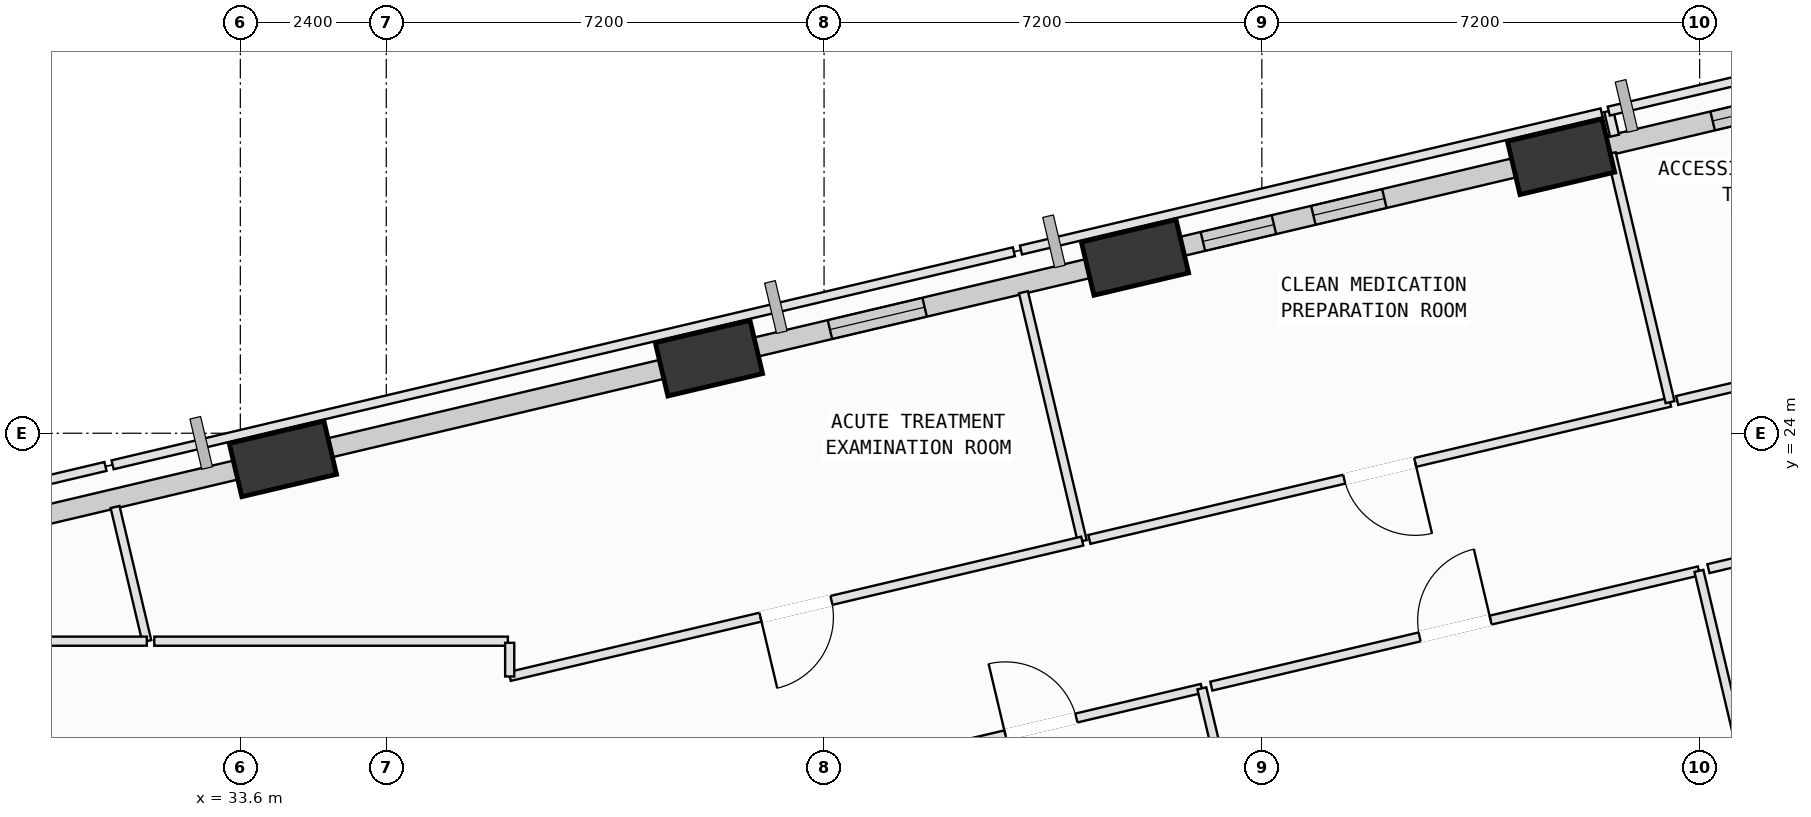
"""IFC4 building model, lengths in metres.
Left out: names, types, materials, properties, quantities, classifications, styles, units other than length and angle.
Written with IfcOpenShell. Run it as: python <this file> out.ifc"""

import sys

from ifc_helpers import new_model, si_unit, direction, frame, frame_2d, origin, origin_2d, place, context, subcontext, project, spatial, rectangle, extrude, element, fill, save


model = new_model("IFC4")
c1 = context("Model", 3, precision=1e-05, world=origin(), true_north=direction((0.0, 1.0)))
c2 = subcontext(c1, "Body", "Model", "MODEL_VIEW")
j1 = project(units=[si_unit("LENGTHUNIT", "METRE"), si_unit("PLANEANGLEUNIT", "RADIAN")], contexts=[c1])
p1 = place(None, origin())
s1 = spatial("IfcSite", under=j1, at=p1, CompositionType="ELEMENT")
p2 = place(p1, origin())
s2 = spatial("IfcBuilding", under=s1, at=p2, CompositionType="ELEMENT")
p3 = place(p2, frame((0.0, 0.0, 79.0)))
s3 = spatial("IfcBuildingStorey", under=s2, at=p3, CompositionType="ELEMENT", Elevation=79.0)
p4 = place(p3, frame((55.321, 28.547, 0.002), z_axis=(-0.016232316816, 0.08955548175, 0.995849550675), x_axis=(-0.916717600894, -0.398986772208, 0.020937903777)))
e1 = element("IfcColumn", 1, at=p4, inside=s3, PredefinedType="COLUMN", context=c2, shape_type="SweptSolid", body=[
    extrude(rectangle(XDim=1.6, YDim=0.9, at=origin_2d()), origin(), (0.0, 0.0, 1.0), 3.956),
])
p5 = place(p3, frame((48.313, 26.891, 0.002), z_axis=(-0.009112910519, 0.060773261368, 0.998109996726), x_axis=(-0.928369181948, -0.371390363656, 0.014137177668)))
e2 = element("IfcColumn", 2, at=p5, inside=s3, PredefinedType="COLUMN", context=c2, shape_type="SweptSolid", body=[
    extrude(rectangle(XDim=1.6, YDim=0.9, at=origin_2d()), origin(), (0.0, 0.0, 1.0), 3.965),
])
p6 = place(p3, frame((41.307, 25.235, 0.002), z_axis=(-0.002025368238, 0.031914893443, 0.999488537933), x_axis=(-0.956662549699, -0.291105897836, 0.007356782483)))
e3 = element("IfcColumn", 3, at=p6, inside=s3, PredefinedType="COLUMN", context=c2, shape_type="SweptSolid", body=[
    extrude(rectangle(XDim=1.6, YDim=0.9, at=origin_2d()), origin(), (0.0, 0.0, 1.0), 3.978),
])
p7 = place(p3, frame((34.3, 23.578, 0.002), z_axis=(0.005075743529, 0.002996523288, 0.999982628687), x_axis=(-0.692844389417, 0.721085857155, 0.001355973417)))
e4 = element("IfcColumn", 4, at=p7, inside=s3, PredefinedType="COLUMN", context=c2, shape_type="SweptSolid", body=[
    extrude(rectangle(XDim=1.6, YDim=0.9, at=origin_2d()), origin(), (0.0, 0.0, 1.0), 3.992),
])
p8 = place(p3, frame((55.894, 28.683, 0.0), z_axis=(0.0, 0.0, 1.0), x_axis=(0.973172593569, 0.230076298489, 0.0)))
e5 = element("IfcWall", 5, at=p8, inside=s3, PredefinedType="SOLIDWALL", context=c2, shape_type="SweptSolid", body=[
    extrude(rectangle(XDim=5.209, YDim=0.32, at=frame_2d((2.604, 0.0))), origin(), (0.0, 0.0, 1.0), 3.085),
])
p9 = place(p8, frame((1.972, 0.0, 0.75)))
e6 = element("IfcOpeningElement", 6, at=p9, cuts=e5, PredefinedType="OPENING", context=c2, shape_type="SweptSolid", body=[
    extrude(rectangle(XDim=1.8, YDim=2.05, at=frame_2d((0.9, 1.025))), frame((0.0, 0.17, 0.0), z_axis=(0.0, -1.0, 0.0), x_axis=(1.0, 0.0, 0.0)), (0.0, 0.0, 1.0), 0.34),
])
p10 = place(p3, frame((48.903, 27.03, 0.0), z_axis=(0.0, 0.0, 1.0), x_axis=(0.973184942666, 0.23002405824, 0.0)))
e7 = element("IfcWall", 7, at=p10, inside=s3, PredefinedType="SOLIDWALL", context=c2, shape_type="SweptSolid", body=[
    extrude(rectangle(XDim=6.024, YDim=0.32, at=frame_2d((3.012, 0.0))), origin(), (0.0, 0.0, 1.0), 3.085),
])
p11 = place(p10, frame((2.409, 0.0, 0.75)))
e8 = element("IfcOpeningElement", 8, at=p11, cuts=e7, PredefinedType="OPENING", context=c2, shape_type="SweptSolid", body=[
    extrude(rectangle(XDim=1.2, YDim=1.75, at=frame_2d((0.6, 0.875))), frame((0.0, 0.17, 0.0), z_axis=(0.0, -1.0, 0.0), x_axis=(1.0, 0.0, 0.0)), (0.0, 0.0, 1.0), 0.34),
])
p12 = place(p10, frame((0.542, 0.0, 0.75)))
e9 = element("IfcOpeningElement", 9, at=p12, cuts=e7, PredefinedType="OPENING", context=c2, shape_type="SweptSolid", body=[
    extrude(rectangle(XDim=1.2, YDim=1.75, at=frame_2d((0.6, 0.875))), frame((0.0, 0.17, 0.0), z_axis=(0.0, -1.0, 0.0), x_axis=(1.0, 0.0, 0.0)), (0.0, 0.0, 1.0), 0.34),
])
p13 = place(p3, frame((41.906, 25.376, 0.0), z_axis=(0.0, 0.0, 1.0), x_axis=(0.97318130013, 0.230039468519, 0.0)))
e10 = element("IfcWall", 10, at=p13, inside=s3, PredefinedType="SOLIDWALL", context=c2, shape_type="SweptSolid", body=[
    extrude(rectangle(XDim=6.0, YDim=0.32, at=frame_2d((3.0, 0.0))), origin(), (0.0, 0.0, 1.0), 3.085),
])
p14 = place(p13, frame((1.43, 0.0, 0.75)))
e11 = element("IfcOpeningElement", 11, at=p14, cuts=e10, PredefinedType="OPENING", context=c2, shape_type="SweptSolid", body=[
    extrude(rectangle(XDim=1.6, YDim=1.95, at=frame_2d((0.8, 0.975))), frame((0.0, 0.17, 0.0), z_axis=(0.0, -1.0, 0.0), x_axis=(1.0, 0.0, 0.0)), (0.0, 0.0, 1.0), 0.34),
])
p15 = place(p3, frame((34.902, 23.721, 0.0), z_axis=(0.0, 0.0, 1.0), x_axis=(0.973182953006, 0.230032475923, 0.0)))
e12 = element("IfcWall", 12, at=p15, inside=s3, PredefinedType="SOLIDWALL", context=c2, shape_type="SweptSolid", body=[
    extrude(rectangle(XDim=5.987, YDim=0.32, at=frame_2d((2.994, 0.0))), origin(), (0.0, 0.0, 1.0), 3.085),
])
p16 = place(p3, frame((28.137, 22.121, 0.0), z_axis=(0.0, 0.0, 1.0), x_axis=(0.973179415544, 0.230047441111, 0.0)))
e13 = element("IfcWall", 13, at=p16, inside=s3, PredefinedType="SOLIDWALL", context=c2, shape_type="SweptSolid", body=[
    extrude(rectangle(XDim=5.736, YDim=0.32, at=frame_2d((2.868, 0.0))), origin(), (0.0, 0.0, 1.0), 3.085),
])
p17 = place(p16, frame((0.928, 0.0, 0.75)))
e14 = element("IfcOpeningElement", 14, at=p17, cuts=e13, PredefinedType="OPENING", context=c2, shape_type="SweptSolid", body=[
    extrude(rectangle(XDim=1.4, YDim=1.85, at=frame_2d((0.7, 0.925))), frame((0.0, 0.17, 0.0), z_axis=(0.0, -1.0, 0.0), x_axis=(1.0, 0.0, 0.0)), (0.0, 0.0, 1.0), 0.34),
])
p18 = place(p3, frame((44.119, 18.552, 0.0), z_axis=(0.0, 0.0, 1.0), x_axis=(0.973159948665, 0.230129777116, 0.0)))
e15 = element("IfcWall", 15, at=p18, inside=s3, PredefinedType="PARTITIONING", context=c2, shape_type="SweptSolid", body=[
    extrude(rectangle(XDim=5.44, YDim=0.15, at=frame_2d((2.72, 0.0))), origin(), (0.0, 0.0, 1.0), 3.7),
])
p19 = place(p18, frame((2.12, 0.0, 0.0)))
e16 = element("IfcOpeningElement", 16, at=p19, cuts=e15, PredefinedType="OPENING", context=c2, shape_type="SweptSolid", body=[
    extrude(rectangle(XDim=1.2, YDim=2.15, at=frame_2d((0.6, 1.075))), frame((0.0, 0.085, 0.0), z_axis=(0.0, -1.0, 0.0), x_axis=(1.0, 0.0, 0.0)), (0.0, 0.0, 1.0), 0.17),
])
p20 = place(p3, frame((49.413, 19.804, 0.0), z_axis=(0.0, 0.0, 1.0), x_axis=(0.230094618591, -0.97316826217, 0.0)))
e17 = element("IfcWall", 17, at=p20, inside=s3, PredefinedType="PARTITIONING", context=c2, shape_type="SweptSolid", body=[
    extrude(rectangle(XDim=13.615, YDim=0.15, at=frame_2d((6.808, 0.0))), origin(), (0.0, 0.0, 1.0), 3.7),
])
p21 = place(p3, frame((49.569, 19.841, 0.0), z_axis=(0.0, 0.0, 1.0), x_axis=(0.973193656839, 0.229987187224, 0.0)))
e18 = element("IfcWall", 18, at=p21, inside=s3, PredefinedType="PARTITIONING", context=c2, shape_type="SweptSolid", body=[
    extrude(rectangle(XDim=8.24, YDim=0.15, at=frame_2d((4.12, 0.0))), origin(), (0.0, 0.0, 1.0), 3.7),
])
p22 = place(p21, frame((3.52, 0.0, 0.0)))
e19 = element("IfcOpeningElement", 19, at=p22, cuts=e18, PredefinedType="OPENING", context=c2, shape_type="SweptSolid", body=[
    extrude(rectangle(XDim=1.2, YDim=2.15, at=frame_2d((0.6, 1.075))), frame((0.0, 0.085, 0.0), z_axis=(0.0, -1.0, 0.0), x_axis=(1.0, 0.0, 0.0)), (0.0, 0.0, 1.0), 0.17),
])
p23 = place(p3, frame((57.588, 21.736, 0.0), z_axis=(0.0, 0.0, 1.0), x_axis=(0.230096091154, -0.973167913998, 0.0)))
e20 = element("IfcWall", 20, at=p23, inside=s3, PredefinedType="PARTITIONING", context=c2, shape_type="SweptSolid", body=[
    extrude(rectangle(XDim=11.665, YDim=0.15, at=frame_2d((5.833, 0.0))), origin(), (0.0, 0.0, 1.0), 3.7),
])
p24 = place(p3, frame((57.744, 21.773, 0.0), z_axis=(0.0, 0.0, 1.0), x_axis=(0.973163112175, 0.230116399028, 0.0)))
e21 = element("IfcWall", 21, at=p24, inside=s3, PredefinedType="PARTITIONING", context=c2, shape_type="SweptSolid", body=[
    extrude(rectangle(XDim=6.24, YDim=0.15, at=frame_2d((3.12, 0.0))), origin(), (0.0, 0.0, 1.0), 3.7),
])
p25 = place(p24, frame((2.52, 0.0, 0.0)))
e22 = element("IfcOpeningElement", 22, at=p25, cuts=e21, PredefinedType="OPENING", context=c2, shape_type="SweptSolid", body=[
    extrude(rectangle(XDim=1.2, YDim=2.15, at=frame_2d((0.6, 1.075))), frame((0.0, 0.085, 0.0), z_axis=(0.0, -1.0, 0.0), x_axis=(1.0, 0.0, 0.0)), (0.0, 0.0, 1.0), 0.17),
])
p26 = place(p3, frame((27.945, 22.641, 0.0), z_axis=(0.0, 0.0, 1.0), x_axis=(0.973146335826, 0.230187334728, 0.0)))
e23 = element("IfcWall", 23, at=p26, inside=s3, PredefinedType="PARTITIONING", context=c2, shape_type="SweptSolid", body=[
    extrude(rectangle(XDim=3.532, YDim=0.15, at=frame_2d((1.766, 0.0))), origin(), (0.0, 0.0, 1.0), 3.7),
])
p27 = place(p3, frame((31.54, 22.787, 0.0), z_axis=(0.0, 0.0, 1.0), x_axis=(0.230155211314, -0.973153933715, 0.0)))
e24 = element("IfcWall", 24, at=p27, inside=s3, PredefinedType="PARTITIONING", context=c2, shape_type="SweptSolid", body=[
    extrude(rectangle(XDim=2.268, YDim=0.15, at=frame_2d((1.134, 0.0))), origin(), (0.0, 0.0, 1.0), 3.7),
])
p28 = place(p3, frame((32.062, 20.58, 0.0), z_axis=(0.0, 0.0, 1.0), x_axis=(-1.0, 0.0, 0.0)))
e25 = element("IfcWall", 25, at=p28, inside=s3, PredefinedType="PARTITIONING", context=c2, shape_type="SweptSolid", body=[
    extrude(rectangle(XDim=12.868, YDim=0.15, at=frame_2d((6.434, 0.0))), origin(), (0.0, 0.0, 1.0), 3.7),
])
p29 = place(p28, frame((5.834, 0.0, 0.0)))
e26 = element("IfcOpeningElement", 26, at=p29, cuts=e25, PredefinedType="OPENING", context=c2, shape_type="SweptSolid", body=[
    extrude(rectangle(XDim=1.2, YDim=2.15, at=frame_2d((0.6, 1.075))), frame((0.0, 0.085, 0.0), z_axis=(0.0, -1.0, 0.0), x_axis=(1.0, 0.0, 0.0)), (0.0, 0.0, 1.0), 0.17),
])
p30 = place(p3, frame((38.0, 20.58, 0.0), z_axis=(0.0, 0.0, 1.0), x_axis=(-1.0, 0.0, 0.0)))
e27 = element("IfcWall", 27, at=p30, inside=s3, PredefinedType="PARTITIONING", context=c2, shape_type="SweptSolid", body=[
    extrude(rectangle(XDim=5.815, YDim=0.15, at=frame_2d((2.907, 0.0))), origin(), (0.0, 0.0, 1.0), 3.285),
])
p31 = place(p3, frame((31.499, 23.481, 0.0), z_axis=(0.0, 0.0, 1.0), x_axis=(0.973176783589, 0.230058574897, 0.0)))
e28 = element("IfcWall", 28, at=p31, inside=s3, PredefinedType="PARTITIONING", context=c2, shape_type="SweptSolid", body=[
    extrude(rectangle(XDim=15.231, YDim=0.15, at=frame_2d((7.616, 0.0))), origin(), (0.0, 0.0, 1.0), 3.085),
])
p32 = place(p3, frame((46.479, 26.319, 0.0), z_axis=(0.0, 0.0, 1.0), x_axis=(0.229935488388, -0.973205872968, 0.0)))
e29 = element("IfcWall", 29, at=p32, inside=s3, PredefinedType="PARTITIONING", context=c2, shape_type="SweptSolid", body=[
    extrude(rectangle(XDim=4.206, YDim=0.15, at=frame_2d((2.103, 0.0))), origin(), (0.0, 0.0, 1.0), 3.7),
])
p33 = place(p3, frame((47.446, 22.226, 0.0), z_axis=(0.0, 0.0, 1.0), x_axis=(-0.973173725455, -0.230071510804, 0.0)))
e30 = element("IfcWall", 30, at=p33, inside=s3, PredefinedType="PARTITIONING", context=c2, shape_type="SweptSolid", body=[
    extrude(rectangle(XDim=9.676, YDim=0.15, at=frame_2d((4.838, 0.0))), origin(), (0.0, 0.0, 1.0), 3.7),
])
p34 = place(p33, frame((4.238, 0.0, 0.0)))
e31 = element("IfcOpeningElement", 31, at=p34, cuts=e30, PredefinedType="OPENING", context=c2, shape_type="SweptSolid", body=[
    extrude(rectangle(XDim=1.2, YDim=2.15, at=frame_2d((0.6, 1.075))), frame((0.0, 0.085, 0.0), z_axis=(0.0, -1.0, 0.0), x_axis=(1.0, 0.0, 0.0)), (0.0, 0.0, 1.0), 0.17),
])
p35 = place(p3, frame((38.03, 20.0, 0.0), z_axis=(0.0, 0.0, 1.0), x_axis=(0.0, 1.0, 0.0)))
e32 = element("IfcWall", 32, at=p35, inside=s3, PredefinedType="PARTITIONING", context=c2, shape_type="SweptSolid", body=[
    extrude(rectangle(XDim=0.553, YDim=0.15, at=frame_2d((0.276, 0.0))), origin(), (0.0, 0.0, 1.0), 3.7),
])
p36 = place(p3, frame((57.113, 24.511, 0.0), z_axis=(0.0, 0.0, 1.0), x_axis=(-0.973189270561, -0.230005747024, 0.0)))
e33 = element("IfcWall", 33, at=p36, inside=s3, PredefinedType="PARTITIONING", context=c2, shape_type="SweptSolid", body=[
    extrude(rectangle(XDim=9.813, YDim=0.15, at=frame_2d((4.907, 0.0))), origin(), (0.0, 0.0, 1.0), 3.7),
])
p37 = place(p36, frame((4.306, 0.0, 0.0)))
e34 = element("IfcOpeningElement", 34, at=p37, cuts=e33, PredefinedType="OPENING", context=c2, shape_type="SweptSolid", body=[
    extrude(rectangle(XDim=1.2, YDim=2.15, at=frame_2d((0.6, 1.075))), frame((0.0, 0.085, 0.0), z_axis=(0.0, -1.0, 0.0), x_axis=(1.0, 0.0, 0.0)), (0.0, 0.0, 1.0), 0.17),
])
p38 = place(p3, frame((46.438, 27.013, 0.0), z_axis=(0.0, 0.0, 1.0), x_axis=(0.973189270561, 0.230005747024, 0.0)))
e35 = element("IfcWall", 35, at=p38, inside=s3, PredefinedType="PARTITIONING", context=c2, shape_type="SweptSolid", body=[
    extrude(rectangle(XDim=9.813, YDim=0.15, at=frame_2d((4.907, 0.0))), origin(), (0.0, 0.0, 1.0), 3.085),
])
p39 = place(p3, frame((56.146, 28.604, 0.0), z_axis=(0.0, 0.0, 1.0), x_axis=(0.229935488388, -0.973205872968, 0.0)))
e36 = element("IfcWall", 36, at=p39, inside=s3, PredefinedType="PARTITIONING", context=c2, shape_type="SweptSolid", body=[
    extrude(rectangle(XDim=4.206, YDim=0.15, at=frame_2d((2.103, 0.0))), origin(), (0.0, 0.0, 1.0), 3.7),
])
p40 = place(p3, frame((63.019, 25.907, 0.0), z_axis=(0.0, 0.0, 1.0), x_axis=(-0.973199812054, -0.2299611398, 0.0)))
e37 = element("IfcWall", 37, at=p40, inside=s3, PredefinedType="PARTITIONING", context=c2, shape_type="SweptSolid", body=[
    extrude(rectangle(XDim=5.948, YDim=0.15, at=frame_2d((2.974, 0.0))), origin(), (0.0, 0.0, 1.0), 3.7),
])
p41 = place(p40, frame((2.514, 0.0, 0.0)))
e38 = element("IfcOpeningElement", 38, at=p41, cuts=e37, PredefinedType="OPENING", context=c2, shape_type="SweptSolid", body=[
    extrude(rectangle(XDim=0.92, YDim=2.1, at=frame_2d((0.46, 1.05))), frame((0.0, 0.085, 0.0), z_axis=(0.0, -1.0, 0.0), x_axis=(1.0, 0.0, 0.0)), (0.0, 0.0, 1.0), 0.17),
])
p42 = place(p3, frame((56.2, 28.894, 0.0), z_axis=(0.0, 0.0, 1.0), x_axis=(-0.228809832901, 0.973471139977, 0.0)))
e39 = element("IfcWall", 39, at=p42, inside=s3, PredefinedType="PARTITIONING", context=c2, shape_type="SweptSolid", body=[
    extrude(rectangle(XDim=0.415, YDim=0.15, at=frame_2d((0.208, 0.0))), origin(), (0.0, 0.0, 1.0), 3.7),
])
p43 = place(p3, frame((56.105, 29.298, 0.0), z_axis=(0.0, 0.0, 1.0), x_axis=(0.973185279241, 0.230022634251, 0.0)))
e40 = element("IfcWall", 40, at=p43, inside=s3, PredefinedType="PARTITIONING", context=c2, shape_type="SweptSolid", body=[
    extrude(rectangle(XDim=5.964, YDim=0.15, at=frame_2d((2.982, 0.0))), origin(), (0.0, 0.0, 1.0), 3.085),
])
p44 = place(p9, origin())
e41 = element("IfcWindow", 41, at=p44, inside=s3, PartitioningType="SINGLE_PANEL", PredefinedType="WINDOW", context=c2, shape_type="SweptSolid", body=[
    extrude(rectangle(XDim=1.8, YDim=2.05, at=frame_2d((0.9, 1.025))), frame((0.0, 0.03, 0.0), z_axis=(0.0, -1.0, 0.0), x_axis=(1.0, 0.0, 0.0)), (0.0, 0.0, 1.0), 0.06),
])
fill(e6, e41)
p45 = place(p11, origin())
e42 = element("IfcWindow", 42, at=p45, inside=s3, PartitioningType="SINGLE_PANEL", PredefinedType="WINDOW", context=c2, shape_type="SweptSolid", body=[
    extrude(rectangle(XDim=1.2, YDim=1.75, at=frame_2d((0.6, 0.875))), frame((0.0, 0.03, 0.0), z_axis=(0.0, -1.0, 0.0), x_axis=(1.0, 0.0, 0.0)), (0.0, 0.0, 1.0), 0.06),
])
fill(e8, e42)
p46 = place(p12, origin())
e43 = element("IfcWindow", 43, at=p46, inside=s3, PartitioningType="SINGLE_PANEL", PredefinedType="WINDOW", context=c2, shape_type="SweptSolid", body=[
    extrude(rectangle(XDim=1.2, YDim=1.75, at=frame_2d((0.6, 0.875))), frame((0.0, 0.03, 0.0), z_axis=(0.0, -1.0, 0.0), x_axis=(1.0, 0.0, 0.0)), (0.0, 0.0, 1.0), 0.06),
])
fill(e9, e43)
p47 = place(p14, origin())
e44 = element("IfcWindow", 44, at=p47, inside=s3, PartitioningType="SINGLE_PANEL", PredefinedType="WINDOW", context=c2, shape_type="SweptSolid", body=[
    extrude(rectangle(XDim=1.6, YDim=1.95, at=frame_2d((0.8, 0.975))), frame((0.0, 0.03, 0.0), z_axis=(0.0, -1.0, 0.0), x_axis=(1.0, 0.0, 0.0)), (0.0, 0.0, 1.0), 0.06),
])
fill(e11, e44)
p48 = place(p19, origin())
e45 = element("IfcDoor", 45, at=p48, inside=s3, OperationType="SINGLE_SWING_LEFT", PredefinedType="DOOR", context=c2, shape_type="SweptSolid", body=[
    extrude(rectangle(XDim=1.2, YDim=2.15, at=frame_2d((0.6, 1.075))), frame((0.0, 0.025, 0.0), z_axis=(0.0, -1.0, 0.0), x_axis=(1.0, 0.0, 0.0)), (0.0, 0.0, 1.0), 0.05),
])
fill(e16, e45)
p49 = place(p22, origin())
e46 = element("IfcDoor", 46, at=p49, inside=s3, OperationType="SINGLE_SWING_RIGHT", PredefinedType="DOOR", context=c2, shape_type="SweptSolid", body=[
    extrude(rectangle(XDim=1.2, YDim=2.15, at=frame_2d((0.6, 1.075))), frame((0.0, 0.025, 0.0), z_axis=(0.0, -1.0, 0.0), x_axis=(1.0, 0.0, 0.0)), (0.0, 0.0, 1.0), 0.05),
])
fill(e19, e46)
p50 = place(p34, origin())
e47 = element("IfcDoor", 47, at=p50, inside=s3, OperationType="SINGLE_SWING_RIGHT", PredefinedType="DOOR", context=c2, shape_type="SweptSolid", body=[
    extrude(rectangle(XDim=1.2, YDim=2.15, at=frame_2d((0.6, 1.075))), frame((0.0, 0.025, 0.0), z_axis=(0.0, -1.0, 0.0), x_axis=(1.0, 0.0, 0.0)), (0.0, 0.0, 1.0), 0.05),
])
fill(e31, e47)
p51 = place(p37, origin())
e48 = element("IfcDoor", 48, at=p51, inside=s3, OperationType="SINGLE_SWING_LEFT", PredefinedType="DOOR", context=c2, shape_type="SweptSolid", body=[
    extrude(rectangle(XDim=1.2, YDim=2.15, at=frame_2d((0.6, 1.075))), frame((0.0, 0.025, 0.0), z_axis=(0.0, -1.0, 0.0), x_axis=(1.0, 0.0, 0.0)), (0.0, 0.0, 1.0), 0.05),
])
fill(e34, e48)
save(model, sys.argv[1])
